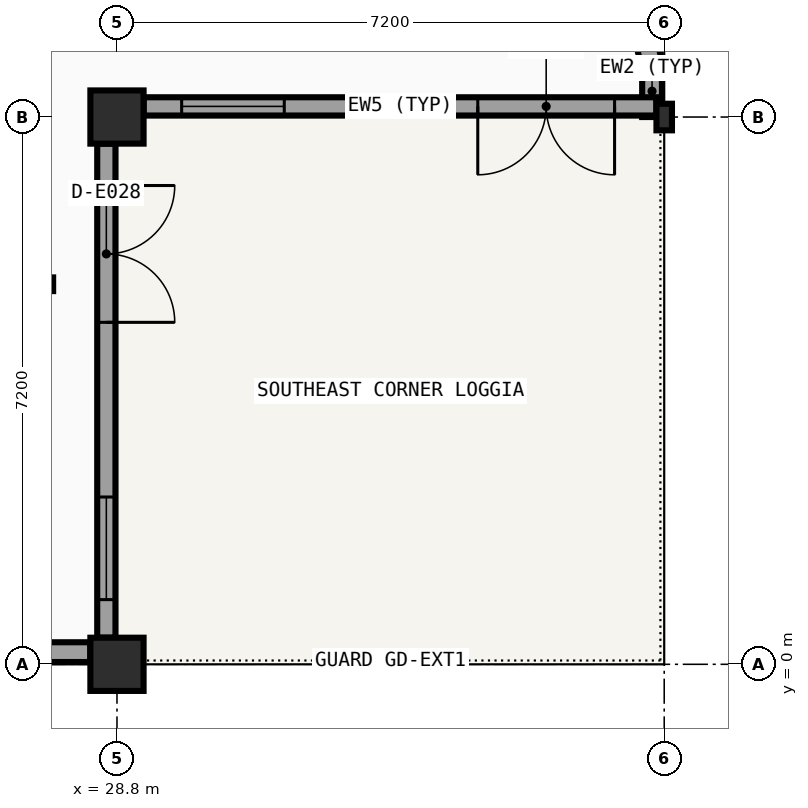
"""IFC4 building model, lengths in metres.
Left out: names, types, materials, properties, quantities, classifications, styles, units other than length and angle.
Written with IfcOpenShell. Run it as: python <this file> out.ifc"""

import sys

from ifc_helpers import new_model, si_unit, direction, frame, frame_2d, origin, origin_2d, place, context, subcontext, project, spatial, rectangle, i_section, extrude, element, fill, save


model = new_model("IFC4")
c1 = context("Model", 3, precision=1e-05, world=origin(), true_north=direction((0.0, 1.0)))
c2 = subcontext(c1, "Body", "Model", "MODEL_VIEW")
j1 = project(units=[si_unit("LENGTHUNIT", "METRE"), si_unit("PLANEANGLEUNIT", "RADIAN")], contexts=[c1])
p1 = place(None, origin())
s1 = spatial("IfcSite", under=j1, at=p1, CompositionType="ELEMENT")
p2 = place(p1, origin())
s2 = spatial("IfcBuilding", under=s1, at=p2, CompositionType="ELEMENT")
p3 = place(p2, frame((0.0, 0.0, 18.9)))
s3 = spatial("IfcBuildingStorey", under=s2, at=p3, CompositionType="ELEMENT", Elevation=18.9)
for number, where, z_axis, x_axis in (
    (1, (28.8, 0.0, 0.0), (0.0, 0.0, 1.0), (1.0, 0.0, 0.0)),
    (2, (28.8, 7.2, 0.0), (0.0, 0.0, 1.0), (1.0, 0.0, 0.0)),
):
    element("IfcColumn", number, at=place(p3, frame(where, z_axis=z_axis, x_axis=x_axis)), inside=s3, PredefinedType="COLUMN", context=c2, shape_type="SweptSolid", body=[
        extrude(rectangle(XDim=0.7, YDim=0.7, at=origin_2d()), origin(), (0.0, 0.0, 1.0), 4.05),
    ])
p4 = place(p3, frame((36.0, 7.2, 0.0), z_axis=(0.0, 0.0, 1.0), x_axis=(1.0, 0.0, 0.0)))
e3 = element("IfcColumn", 3, at=p4, inside=s3, PredefinedType="COLUMN", context=c2, shape_type="SweptSolid", body=[
    extrude(i_section(OverallWidth=0.204, OverallDepth=0.35, WebThickness=0.009, FlangeThickness=0.015, FilletRadius=0.015, at=origin_2d()), origin(), (0.0, 0.0, 1.0), 4.05),
])
p5 = place(p3, frame((35.84, 7.88, 0.0), z_axis=(0.0, 0.0, 1.0), x_axis=(0.0, -1.0, 0.0)))
e4 = element("IfcWall", 4, at=p5, inside=s3, PredefinedType="SOLIDWALL", context=c2, shape_type="SweptSolid", body=[
    extrude(rectangle(XDim=0.68, YDim=0.26, at=frame_2d((0.34, 0.0))), origin(), (0.0, 0.0, 1.0), 3.216),
])
p6 = place(p3, frame((35.08, 11.048, 0.0), z_axis=(0.0, 0.0, 1.0), x_axis=(0.233443812137, -0.972370292931, 0.0)))
e5 = element("IfcWall", 5, at=p6, inside=s3, PredefinedType="SOLIDWALL", context=c2, shape_type="SweptSolid", body=[
    extrude(rectangle(XDim=3.258, YDim=0.28, at=frame_2d((1.629, 0.0))), origin(), (0.0, 0.0, 1.0), 3.8),
])
p7 = place(p6, frame((0.879, 0.0, 0.8)))
e6 = element("IfcOpeningElement", 6, at=p7, cuts=e5, PredefinedType="OPENING", context=c2, shape_type="SweptSolid", body=[
    extrude(rectangle(XDim=1.5, YDim=1.7, at=frame_2d((0.75, 0.85))), frame((0.0, 0.15, 0.0), z_axis=(0.0, -1.0, 0.0), x_axis=(1.0, 0.0, 0.0)), (0.0, 0.0, 1.0), 0.3),
])
p8 = place(p3, frame((35.897, 7.34, 0.0), z_axis=(0.0, 0.0, 1.0), x_axis=(-1.0, 0.0, 0.0)))
e7 = element("IfcWall", 7, at=p8, inside=s3, PredefinedType="SOLIDWALL", context=c2, shape_type="SweptSolid", body=[
    extrude(rectangle(XDim=6.746, YDim=0.24, at=frame_2d((3.373, 0.0))), origin(), (0.0, 0.0, 1.0), 3.216),
])
p9 = place(p8, frame((0.55, 0.0, 0.0)))
e8 = element("IfcOpeningElement", 8, at=p9, cuts=e7, PredefinedType="OPENING", context=c2, shape_type="SweptSolid", body=[
    extrude(rectangle(XDim=1.8, YDim=2.15, at=frame_2d((0.9, 1.075))), frame((0.0, 0.13, 0.0), z_axis=(0.0, -1.0, 0.0), x_axis=(1.0, 0.0, 0.0)), (0.0, 0.0, 1.0), 0.26),
])
p10 = place(p8, frame((4.896, 0.0, 0.85)))
e9 = element("IfcOpeningElement", 9, at=p10, cuts=e7, PredefinedType="OPENING", context=c2, shape_type="SweptSolid", body=[
    extrude(rectangle(XDim=1.35, YDim=1.85, at=frame_2d((0.675, 0.925))), frame((0.0, 0.13, 0.0), z_axis=(0.0, -1.0, 0.0), x_axis=(1.0, 0.0, 0.0)), (0.0, 0.0, 1.0), 0.26),
])
p11 = place(p3, frame((28.66, 6.849, 0.0), z_axis=(0.0, 0.0, 1.0), x_axis=(0.0, -1.0, 0.0)))
e10 = element("IfcWall", 10, at=p11, inside=s3, PredefinedType="SOLIDWALL", context=c2, shape_type="SweptSolid", body=[
    extrude(rectangle(XDim=6.498, YDim=0.24, at=frame_2d((3.249, 0.0))), origin(), (0.0, 0.0, 1.0), 3.216),
])
p12 = place(p11, frame((0.55, 0.0, 0.0)))
e11 = element("IfcOpeningElement", 11, at=p12, cuts=e10, PredefinedType="OPENING", context=c2, shape_type="SweptSolid", body=[
    extrude(rectangle(XDim=1.8, YDim=2.15, at=frame_2d((0.9, 1.075))), frame((0.0, 0.13, 0.0), z_axis=(0.0, -1.0, 0.0), x_axis=(1.0, 0.0, 0.0)), (0.0, 0.0, 1.0), 0.26),
])
p13 = place(p11, frame((4.648, 0.0, 0.85)))
e12 = element("IfcOpeningElement", 12, at=p13, cuts=e10, PredefinedType="OPENING", context=c2, shape_type="SweptSolid", body=[
    extrude(rectangle(XDim=1.35, YDim=1.85, at=frame_2d((0.675, 0.925))), frame((0.0, 0.13, 0.0), z_axis=(0.0, -1.0, 0.0), x_axis=(1.0, 0.0, 0.0)), (0.0, 0.0, 1.0), 0.26),
])
p14 = place(p3, frame((28.449, 0.16, 0.0), z_axis=(0.0, 0.0, 1.0), x_axis=(-1.0, 0.0, 0.0)))
e13 = element("IfcWall", 13, at=p14, inside=s3, PredefinedType="SOLIDWALL", context=c2, shape_type="SweptSolid", body=[
    extrude(rectangle(XDim=0.68, YDim=0.26, at=frame_2d((0.34, 0.0))), origin(), (0.0, 0.0, 1.0), 3.216),
])
p15 = place(p3, frame((4.64, 5.0, 0.0), z_axis=(0.0, 0.0, 1.0), x_axis=(1.0, 0.0, 0.0)))
e14 = element("IfcWall", 14, at=p15, inside=s3, PredefinedType="PARTITIONING", context=c2, shape_type="SweptSolid", body=[
    extrude(rectangle(XDim=23.32, YDim=0.18, at=frame_2d((11.66, 0.0))), origin(), (0.0, 0.0, 1.0), 3.206),
])
p16 = place(p15, frame((5.79, 0.0, 0.0)))
e15 = element("IfcOpeningElement", 15, at=p16, cuts=e14, PredefinedType="OPENING", context=c2, shape_type="SweptSolid", body=[
    extrude(rectangle(XDim=1.0, YDim=2.1, at=frame_2d((0.5, 1.05))), frame((0.0, 0.1, 0.0), z_axis=(0.0, -1.0, 0.0), x_axis=(1.0, 0.0, 0.0)), (0.0, 0.0, 1.0), 0.2),
])
p17 = place(p9, origin())
e16 = element("IfcDoor", 16, at=p17, inside=s3, OperationType="DOUBLE_DOOR_SINGLE_SWING", PredefinedType="DOOR", context=c2, shape_type="SweptSolid", body=[
    extrude(rectangle(XDim=1.8, YDim=2.15, at=frame_2d((0.9, 1.075))), frame((0.0, 0.025, 0.0), z_axis=(0.0, -1.0, 0.0), x_axis=(1.0, 0.0, 0.0)), (0.0, 0.0, 1.0), 0.05),
])
fill(e8, e16)
p18 = place(p10, origin())
e17 = element("IfcWindow", 17, at=p18, inside=s3, PartitioningType="SINGLE_PANEL", PredefinedType="WINDOW", context=c2, shape_type="SweptSolid", body=[
    extrude(rectangle(XDim=1.35, YDim=1.85, at=frame_2d((0.675, 0.925))), frame((0.0, 0.03, 0.0), z_axis=(0.0, -1.0, 0.0), x_axis=(1.0, 0.0, 0.0)), (0.0, 0.0, 1.0), 0.06),
])
fill(e9, e17)
p19 = place(p12, origin())
e18 = element("IfcDoor", 18, at=p19, inside=s3, OperationType="DOUBLE_DOOR_SINGLE_SWING", PredefinedType="DOOR", context=c2, shape_type="SweptSolid", body=[
    extrude(rectangle(XDim=1.8, YDim=2.15, at=frame_2d((0.9, 1.075))), frame((0.0, 0.025, 0.0), z_axis=(0.0, -1.0, 0.0), x_axis=(1.0, 0.0, 0.0)), (0.0, 0.0, 1.0), 0.05),
])
fill(e11, e18)
p20 = place(p13, origin())
e19 = element("IfcWindow", 19, at=p20, inside=s3, PartitioningType="SINGLE_PANEL", PredefinedType="WINDOW", context=c2, shape_type="SweptSolid", body=[
    extrude(rectangle(XDim=1.35, YDim=1.85, at=frame_2d((0.675, 0.925))), frame((0.0, 0.03, 0.0), z_axis=(0.0, -1.0, 0.0), x_axis=(1.0, 0.0, 0.0)), (0.0, 0.0, 1.0), 0.06),
])
fill(e12, e19)
save(model, sys.argv[1])
